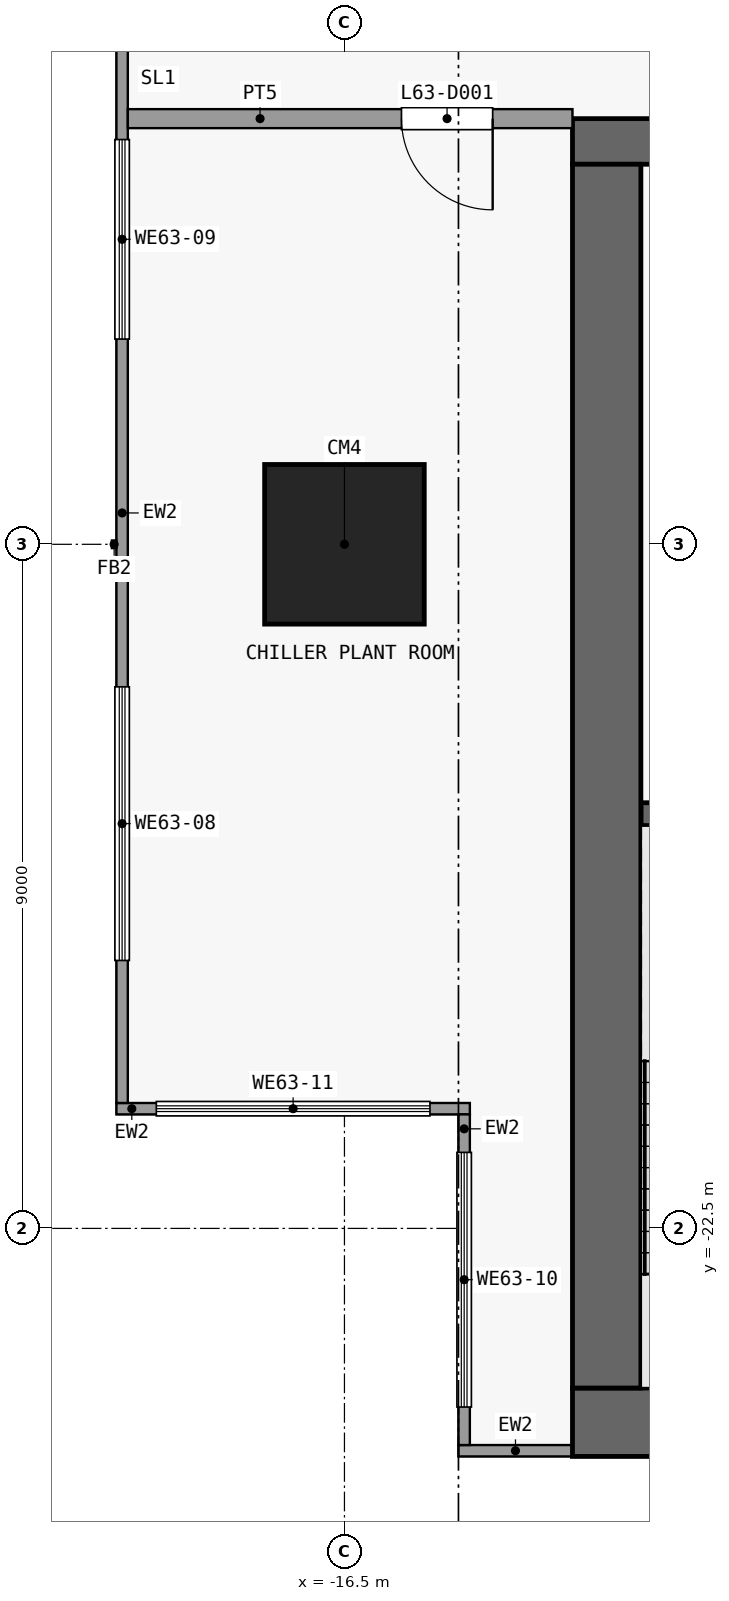
"""IFC4 building model, lengths in metres.
Left out: names, types, materials, properties, quantities, classifications, styles, units other than length and angle.
Written with IfcOpenShell. Run it as: python <this file> out.ifc"""

import sys

from ifc_helpers import new_model, si_unit, direction, frame, frame_2d, origin, origin_2d, place, context, subcontext, project, spatial, rectangle, extrude, element, fill, save


model = new_model("IFC4")
c1 = context("Model", 3, precision=1e-05, world=origin(), true_north=direction((0.0, 1.0)))
c2 = subcontext(c1, "Body", "Model", "MODEL_VIEW")
j1 = project(units=[si_unit("LENGTHUNIT", "METRE"), si_unit("PLANEANGLEUNIT", "RADIAN")], contexts=[c1])
p1 = place(None, origin())
s1 = spatial("IfcSite", under=j1, at=p1, CompositionType="ELEMENT")
p2 = place(p1, origin())
s2 = spatial("IfcBuilding", under=s1, at=p2, CompositionType="ELEMENT")
p3 = place(p2, frame((0.0, 0.0, 248.3)))
s3 = spatial("IfcBuildingStorey", under=s2, at=p3, CompositionType="ELEMENT", Elevation=248.3)
p4 = place(p3, frame((-16.5, -13.5, 0.0), z_axis=(0.0, 0.0, 1.0), x_axis=(1.0, 0.0, 0.0)))
e1 = element("IfcColumn", 1, at=p4, inside=s3, PredefinedType="COLUMN", context=c2, shape_type="SweptSolid", body=[
    extrude(rectangle(XDim=2.1, YDim=2.1, at=origin_2d()), origin(), (0.0, 0.0, 1.0), 7.2),
])
p5 = place(p3, frame((-13.5, -25.05, 0.0), z_axis=(0.0, 0.0, 1.0), x_axis=(1.0, 0.0, 0.0)))
e2 = element("IfcWall", 2, at=p5, inside=s3, PredefinedType="SHEAR", context=c2, shape_type="SweptSolid", body=[
    extrude(rectangle(XDim=27.0, YDim=0.9, at=frame_2d((13.5, 0.0))), origin(), (0.0, 0.0, 1.0), 6.9),
])
p6 = place(p3, frame((-13.5, -8.2, 0.0), z_axis=(0.0, 0.0, 1.0), x_axis=(1.0, 0.0, 0.0)))
e3 = element("IfcWall", 3, at=p6, inside=s3, PredefinedType="SHEAR", context=c2, shape_type="SweptSolid", body=[
    extrude(rectangle(XDim=27.0, YDim=0.6, at=frame_2d((13.5, 0.0))), origin(), (0.0, 0.0, 1.0), 6.9),
])
p7 = place(p6, frame((7.8, 0.0, 0.0)))
e4 = element("IfcOpeningElement", 4, at=p7, cuts=e3, PredefinedType="OPENING", context=c2, shape_type="SweptSolid", body=[
    extrude(rectangle(XDim=1.8, YDim=2.1, at=frame_2d((0.9, 1.05))), frame((0.0, 0.31, 0.0), z_axis=(0.0, -1.0, 0.0), x_axis=(1.0, 0.0, 0.0)), (0.0, 0.0, 1.0), 0.62),
])
p8 = place(p6, frame((17.4, 0.0, 0.0)))
e5 = element("IfcOpeningElement", 5, at=p8, cuts=e3, PredefinedType="OPENING", context=c2, shape_type="SweptSolid", body=[
    extrude(rectangle(XDim=1.8, YDim=2.1, at=frame_2d((0.9, 1.05))), frame((0.0, 0.31, 0.0), z_axis=(0.0, -1.0, 0.0), x_axis=(1.0, 0.0, 0.0)), (0.0, 0.0, 1.0), 0.62),
])
p9 = place(p6, frame((1.725, 0.0, 0.0)))
e6 = element("IfcOpeningElement", 6, at=p9, cuts=e3, PredefinedType="OPENING", context=c2, shape_type="SweptSolid", body=[
    extrude(rectangle(XDim=1.2, YDim=2.1, at=frame_2d((0.6, 1.05))), frame((0.0, 0.31, 0.0), z_axis=(0.0, -1.0, 0.0), x_axis=(1.0, 0.0, 0.0)), (0.0, 0.0, 1.0), 0.62),
])
p10 = place(p6, frame((23.375, 0.0, 0.0)))
e7 = element("IfcOpeningElement", 7, at=p10, cuts=e3, PredefinedType="OPENING", context=c2, shape_type="SweptSolid", body=[
    extrude(rectangle(XDim=0.9, YDim=2.1, at=frame_2d((0.45, 1.05))), frame((0.0, 0.31, 0.0), z_axis=(0.0, -1.0, 0.0), x_axis=(1.0, 0.0, 0.0)), (0.0, 0.0, 1.0), 0.62),
])
p11 = place(p3, frame((-13.05, -24.6, 0.0), z_axis=(0.0, 0.0, 1.0), x_axis=(0.0, 1.0, 0.0)))
e8 = element("IfcWall", 8, at=p11, inside=s3, PredefinedType="SHEAR", context=c2, shape_type="SweptSolid", body=[
    extrude(rectangle(XDim=16.1, YDim=0.9, at=frame_2d((8.05, 0.0))), origin(), (0.0, 0.0, 1.0), 6.9),
])
p12 = place(p3, frame((-12.6, -17.05, 0.0), z_axis=(0.0, 0.0, 1.0), x_axis=(1.0, 0.0, 0.0)))
e9 = element("IfcWall", 9, at=p12, inside=s3, PredefinedType="SHEAR", context=c2, shape_type="SweptSolid", body=[
    extrude(rectangle(XDim=3.1, YDim=0.3, at=frame_2d((1.55, 0.0))), origin(), (0.0, 0.0, 1.0), 6.9),
])
p13 = place(p3, frame((-13.5, -25.425, 0.0), z_axis=(0.0, 0.0, 1.0), x_axis=(-1.0, 0.0, 0.0)))
e10 = element("IfcWall", 10, at=p13, inside=s3, PredefinedType="SOLIDWALL", context=c2, shape_type="SweptSolid", body=[
    extrude(rectangle(XDim=1.5, YDim=0.15, at=frame_2d((0.75, 0.0))), origin(), (0.0, 0.0, 1.0), 6.9),
])
p14 = place(p3, frame((-19.425, -20.85, 0.0), z_axis=(0.0, 0.0, 1.0), x_axis=(0.0, 1.0, 0.0)))
e11 = element("IfcWall", 11, at=p14, inside=s3, PredefinedType="SOLIDWALL", context=c2, shape_type="SweptSolid", body=[
    extrude(rectangle(XDim=16.35, YDim=0.15, at=frame_2d((8.175, 0.0))), origin(), (0.0, 0.0, 1.0), 6.9),
])
p15 = place(p14, frame((1.875, 0.0, 1.2)))
e12 = element("IfcOpeningElement", 12, at=p15, cuts=e11, PredefinedType="OPENING", context=c2, shape_type="SweptSolid", body=[
    extrude(rectangle(XDim=3.6, YDim=3.0, at=frame_2d((1.8, 1.5))), frame((0.0, 0.085, 0.0), z_axis=(0.0, -1.0, 0.0), x_axis=(1.0, 0.0, 0.0)), (0.0, 0.0, 1.0), 0.17),
])
p16 = place(p14, frame((10.05, 0.0, 1.2)))
e13 = element("IfcOpeningElement", 13, at=p16, cuts=e11, PredefinedType="OPENING", context=c2, shape_type="SweptSolid", body=[
    extrude(rectangle(XDim=2.625, YDim=3.0, at=frame_2d((1.312, 1.5))), frame((0.0, 0.085, 0.0), z_axis=(0.0, -1.0, 0.0), x_axis=(1.0, 0.0, 0.0)), (0.0, 0.0, 1.0), 0.17),
])
p17 = place(p3, frame((-14.925, -25.35, 0.0), z_axis=(0.0, 0.0, 1.0), x_axis=(0.0, 1.0, 0.0)))
e14 = element("IfcWall", 14, at=p17, inside=s3, PredefinedType="SOLIDWALL", context=c2, shape_type="SweptSolid", body=[
    extrude(rectangle(XDim=4.35, YDim=0.15, at=frame_2d((2.175, 0.0))), origin(), (0.0, 0.0, 1.0), 6.9),
])
p18 = place(p17, frame((0.5, 0.0, 1.2)))
e15 = element("IfcOpeningElement", 15, at=p18, cuts=e14, PredefinedType="OPENING", context=c2, shape_type="SweptSolid", body=[
    extrude(rectangle(XDim=3.35, YDim=3.0, at=frame_2d((1.675, 1.5))), frame((0.0, 0.085, 0.0), z_axis=(0.0, -1.0, 0.0), x_axis=(1.0, 0.0, 0.0)), (0.0, 0.0, 1.0), 0.17),
])
p19 = place(p3, frame((-14.85, -20.925, 0.0), z_axis=(0.0, 0.0, 1.0), x_axis=(-1.0, 0.0, 0.0)))
e16 = element("IfcWall", 16, at=p19, inside=s3, PredefinedType="SOLIDWALL", context=c2, shape_type="SweptSolid", body=[
    extrude(rectangle(XDim=4.65, YDim=0.15, at=frame_2d((2.325, 0.0))), origin(), (0.0, 0.0, 1.0), 6.9),
])
p20 = place(p19, frame((0.525, 0.0, 1.2)))
e17 = element("IfcOpeningElement", 17, at=p20, cuts=e16, PredefinedType="OPENING", context=c2, shape_type="SweptSolid", body=[
    extrude(rectangle(XDim=3.6, YDim=3.0, at=frame_2d((1.8, 1.5))), frame((0.0, 0.085, 0.0), z_axis=(0.0, -1.0, 0.0), x_axis=(1.0, 0.0, 0.0)), (0.0, 0.0, 1.0), 0.17),
])
p21 = place(p3, frame((-19.35, -7.9, 0.0), z_axis=(0.0, 0.0, 1.0), x_axis=(1.0, 0.0, 0.0)))
e18 = element("IfcWall", 18, at=p21, inside=s3, PredefinedType="PARTITIONING", context=c2, shape_type="SweptSolid", body=[
    extrude(rectangle(XDim=5.85, YDim=0.25, at=frame_2d((2.925, 0.0))), origin(), (0.0, 0.0, 1.0), 6.9),
])
p22 = place(p21, frame((3.6, 0.0, 0.0)))
e19 = element("IfcOpeningElement", 19, at=p22, cuts=e18, PredefinedType="OPENING", context=c2, shape_type="SweptSolid", body=[
    extrude(rectangle(XDim=1.2, YDim=2.1, at=frame_2d((0.6, 1.05))), frame((0.0, 0.135, 0.0), z_axis=(0.0, -1.0, 0.0), x_axis=(1.0, 0.0, 0.0)), (0.0, 0.0, 1.0), 0.27),
])
p23 = place(p15, origin())
e20 = element("IfcWindow", 20, at=p23, inside=s3, PartitioningType="SINGLE_PANEL", PredefinedType="WINDOW", context=c2, shape_type="SweptSolid", body=[
    extrude(rectangle(XDim=3.6, YDim=3.0, at=frame_2d((1.8, 1.5))), frame((0.0, 0.03, 0.0), z_axis=(0.0, -1.0, 0.0), x_axis=(1.0, 0.0, 0.0)), (0.0, 0.0, 1.0), 0.06),
])
fill(e12, e20)
p24 = place(p16, origin())
e21 = element("IfcWindow", 21, at=p24, inside=s3, PartitioningType="SINGLE_PANEL", PredefinedType="WINDOW", context=c2, shape_type="SweptSolid", body=[
    extrude(rectangle(XDim=2.625, YDim=3.0, at=frame_2d((1.312, 1.5))), frame((0.0, 0.03, 0.0), z_axis=(0.0, -1.0, 0.0), x_axis=(1.0, 0.0, 0.0)), (0.0, 0.0, 1.0), 0.06),
])
fill(e13, e21)
p25 = place(p18, origin())
e22 = element("IfcWindow", 22, at=p25, inside=s3, PartitioningType="SINGLE_PANEL", PredefinedType="WINDOW", context=c2, shape_type="SweptSolid", body=[
    extrude(rectangle(XDim=3.35, YDim=3.0, at=frame_2d((1.675, 1.5))), frame((0.0, 0.03, 0.0), z_axis=(0.0, -1.0, 0.0), x_axis=(1.0, 0.0, 0.0)), (0.0, 0.0, 1.0), 0.06),
])
fill(e15, e22)
p26 = place(p20, origin())
e23 = element("IfcWindow", 23, at=p26, inside=s3, PartitioningType="SINGLE_PANEL", PredefinedType="WINDOW", context=c2, shape_type="SweptSolid", body=[
    extrude(rectangle(XDim=3.6, YDim=3.0, at=frame_2d((1.8, 1.5))), frame((0.0, 0.03, 0.0), z_axis=(0.0, -1.0, 0.0), x_axis=(1.0, 0.0, 0.0)), (0.0, 0.0, 1.0), 0.06),
])
fill(e17, e23)
p27 = place(p22, origin())
e24 = element("IfcDoor", 24, at=p27, inside=s3, OperationType="SINGLE_SWING_RIGHT", PredefinedType="DOOR", context=c2, shape_type="SweptSolid", body=[
    extrude(rectangle(XDim=1.2, YDim=2.1, at=frame_2d((0.6, 1.05))), frame((0.0, 0.025, 0.0), z_axis=(0.0, -1.0, 0.0), x_axis=(1.0, 0.0, 0.0)), (0.0, 0.0, 1.0), 0.05),
])
fill(e19, e24)
save(model, sys.argv[1])
